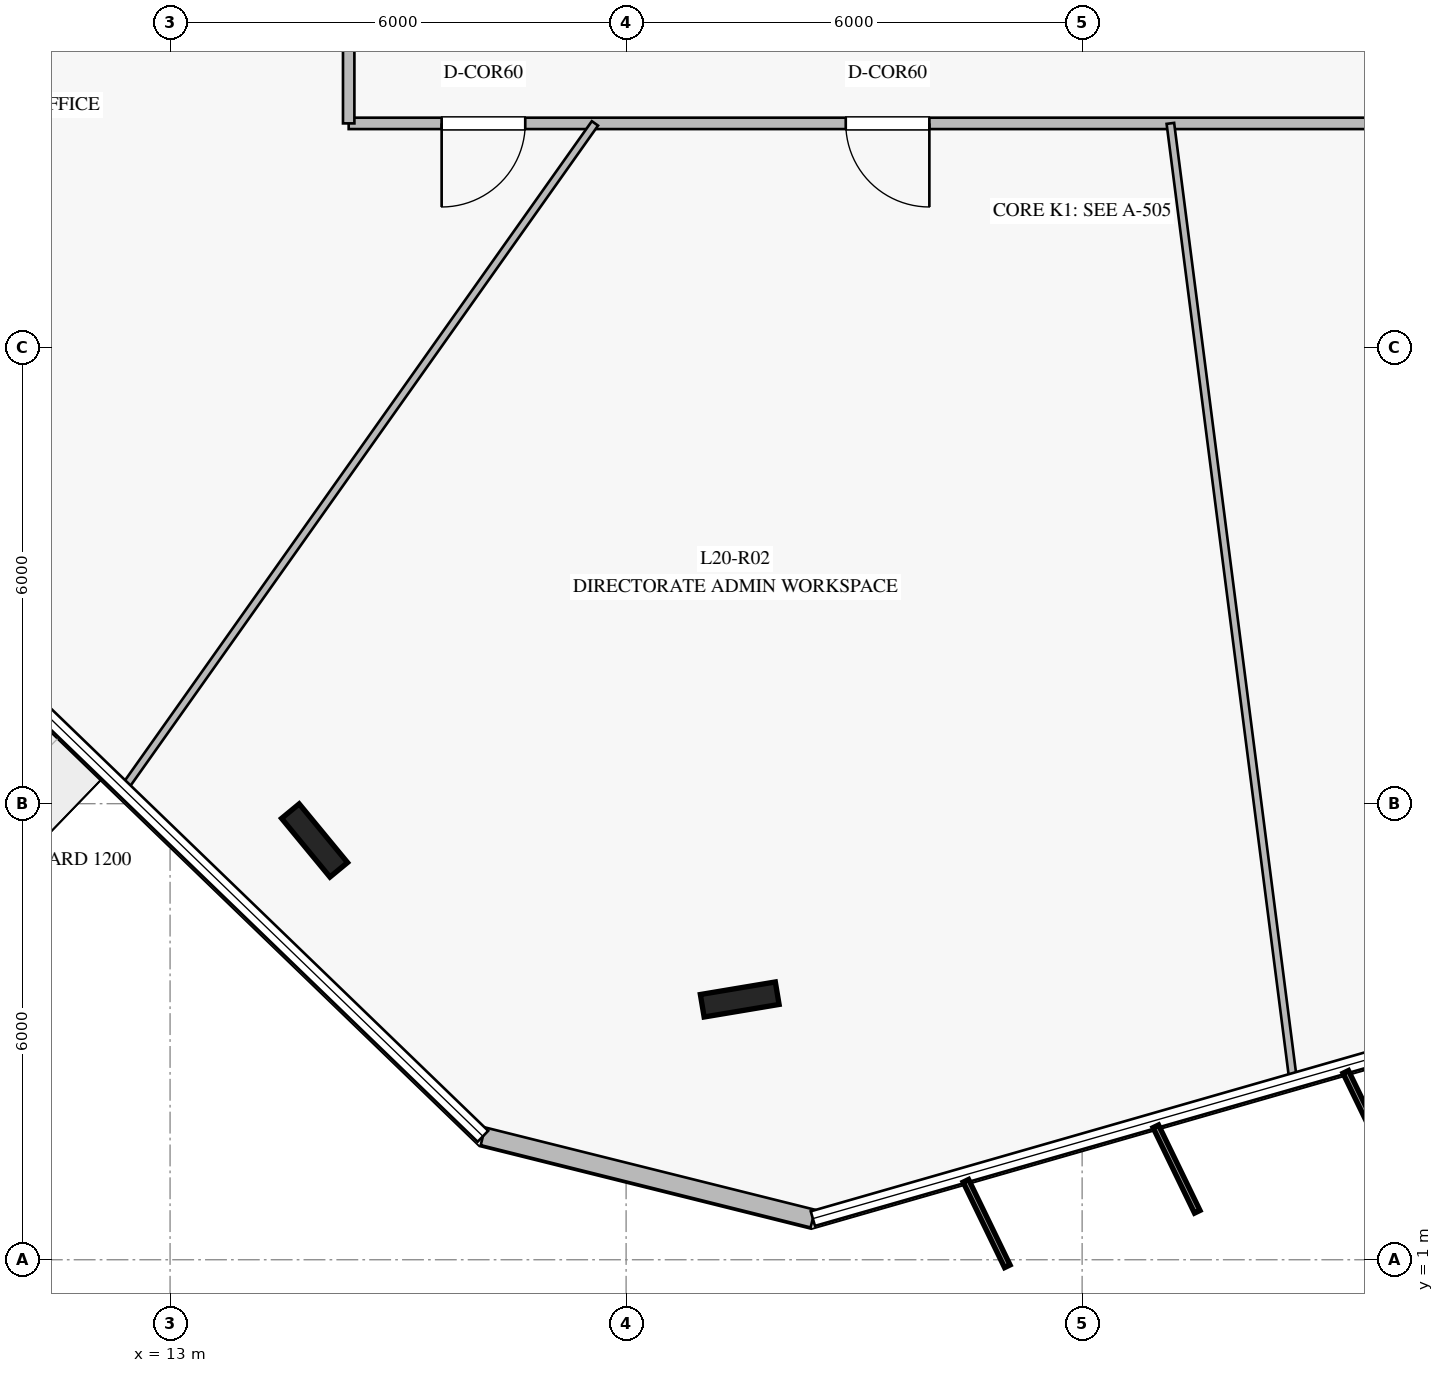
"""IFC4 building model, lengths in metres.
Left out: names, types, materials, properties, quantities, classifications, styles, units other than length and angle.
Written with IfcOpenShell. Run it as: python <this file> out.ifc"""

import sys

from ifc_helpers import new_model, si_unit, direction, frame, frame_2d, origin, origin_2d, place, context, subcontext, project, spatial, rectangle, i_section, extrude, element, fill, save


model = new_model("IFC4")
c1 = context("Model", 3, precision=1e-05, world=origin(), true_north=direction((0.0, 1.0)))
c2 = subcontext(c1, "Body", "Model", "MODEL_VIEW")
j1 = project(units=[si_unit("LENGTHUNIT", "METRE"), si_unit("PLANEANGLEUNIT", "RADIAN")], contexts=[c1])
p1 = place(None, origin())
s1 = spatial("IfcSite", under=j1, at=p1, CompositionType="ELEMENT")
p2 = place(p1, origin())
s2 = spatial("IfcBuilding", under=s1, at=p2, CompositionType="ELEMENT")
p3 = place(p2, frame((0.0, 0.0, 84.0)))
s3 = spatial("IfcBuildingStorey", under=s2, at=p3, CompositionType="ELEMENT", Elevation=84.0)
for number, where, z_axis, x_axis in (
    (1, (14.901, 6.516, 0.0), (0.0, 0.0, 1.0), (-0.636, 0.772, 0.0)),
    (2, (20.495, 4.424, 0.0), (0.0, 0.0, 1.0), (0.986, 0.165, 0.0)),
):
    element("IfcColumn", number, at=place(p3, frame(where, z_axis=z_axis, x_axis=x_axis)), inside=s3, PredefinedType="COLUMN", context=c2, shape_type="SweptSolid", body=[
        extrude(i_section(OverallWidth=0.3, OverallDepth=1.0, WebThickness=0.019, FlangeThickness=0.036, at=origin_2d()), origin(), (0.0, 0.0, 1.0), 4.0),
    ])
p4 = place(p3, frame((17.116, 2.624, 0.0), z_axis=(0.0, 0.0, 1.0), x_axis=(0.970261147955, -0.242060539471, 0.0)))
e3 = element("IfcWall", 3, at=p4, inside=s3, PredefinedType="STANDARD", context=c2, shape_type="SweptSolid", body=[
    extrude(rectangle(XDim=4.474, YDim=0.24, at=frame_2d((2.237, 0.0))), origin(), (0.0, 0.0, 1.0), 3.76),
])
p5 = place(p3, frame((34.65, 15.95, 0.0), z_axis=(0.0, 0.0, 1.0), x_axis=(-1.0, 0.0, 0.0)))
e4 = element("IfcWall", 4, at=p5, inside=s3, PredefinedType="PARTITIONING", context=c2, shape_type="SweptSolid", body=[
    extrude(rectangle(XDim=19.3, YDim=0.15, at=frame_2d((9.65, 0.0))), origin(), (0.0, 0.0, 1.0), 3.21),
])
p6 = place(p5, frame((16.977, 0.0, 0.0)))
e5 = element("IfcOpeningElement", 5, at=p6, cuts=e4, PredefinedType="OPENING", context=c2, shape_type="SweptSolid", body=[
    extrude(rectangle(XDim=1.1, YDim=2.2, at=frame_2d((0.55, 1.1))), frame((0.0, 0.085, 0.0), z_axis=(0.0, -1.0, 0.0), x_axis=(1.0, 0.0, 0.0)), (0.0, 0.0, 1.0), 0.17),
])
p7 = place(p5, frame((11.66, 0.0, 0.0)))
e6 = element("IfcOpeningElement", 6, at=p7, cuts=e4, PredefinedType="OPENING", context=c2, shape_type="SweptSolid", body=[
    extrude(rectangle(XDim=1.1, YDim=2.2, at=frame_2d((0.55, 1.1))), frame((0.0, 0.085, 0.0), z_axis=(0.0, -1.0, 0.0), x_axis=(1.0, 0.0, 0.0)), (0.0, 0.0, 1.0), 0.17),
])
p8 = place(p3, frame((15.35, 15.95, 0.0), z_axis=(0.0, 0.0, 1.0), x_axis=(0.0, 1.0, 0.0)))
e7 = element("IfcWall", 7, at=p8, inside=s3, PredefinedType="PARTITIONING", context=c2, shape_type="SweptSolid", body=[
    extrude(rectangle(XDim=18.1, YDim=0.15, at=frame_2d((9.05, 0.0))), origin(), (0.0, 0.0, 1.0), 3.21),
])
p9 = place(p8, frame((12.936, 0.0, 0.0)))
e8 = element("IfcOpeningElement", 8, at=p9, cuts=e7, PredefinedType="OPENING", context=c2, shape_type="SweptSolid", body=[
    extrude(rectangle(XDim=1.1, YDim=2.2, at=frame_2d((0.55, 1.1))), frame((0.0, 0.085, 0.0), z_axis=(0.0, -1.0, 0.0), x_axis=(1.0, 0.0, 0.0)), (0.0, 0.0, 1.0), 0.17),
])
p10 = place(p3, frame((18.59, 15.95, 0.0), z_axis=(0.0, 0.0, 1.0), x_axis=(-0.577987627676, -0.816045527071, 0.0)))
e9 = element("IfcWall", 9, at=p10, inside=s3, PredefinedType="MOVABLE", context=c2, shape_type="SweptSolid", body=[
    extrude(rectangle(XDim=10.715, YDim=0.1, at=frame_2d((5.357, 0.0))), origin(), (0.0, 0.0, 1.0), 3.06),
])
p11 = place(p3, frame((26.161, 15.95, 0.0), z_axis=(0.0, 0.0, 1.0), x_axis=(0.127277961903, -0.991867088079, 0.0)))
e10 = element("IfcWall", 10, at=p11, inside=s3, PredefinedType="MOVABLE", context=c2, shape_type="SweptSolid", body=[
    extrude(rectangle(XDim=12.681, YDim=0.1, at=frame_2d((6.34, 0.0))), origin(), (0.0, 0.0, 1.0), 3.05),
])
p12 = place(p6, origin())
e11 = element("IfcDoor", 11, at=p12, inside=s3, OperationType="SINGLE_SWING_RIGHT", PredefinedType="DOOR", context=c2, shape_type="SweptSolid", body=[
    extrude(rectangle(XDim=1.1, YDim=2.2, at=frame_2d((0.55, 1.1))), frame((0.0, 0.025, 0.0), z_axis=(0.0, -1.0, 0.0), x_axis=(1.0, 0.0, 0.0)), (0.0, 0.0, 1.0), 0.05),
])
fill(e5, e11)
p13 = place(p7, origin())
e12 = element("IfcDoor", 12, at=p13, inside=s3, OperationType="SINGLE_SWING_LEFT", PredefinedType="DOOR", context=c2, shape_type="SweptSolid", body=[
    extrude(rectangle(XDim=1.1, YDim=2.2, at=frame_2d((0.55, 1.1))), frame((0.0, 0.025, 0.0), z_axis=(0.0, -1.0, 0.0), x_axis=(1.0, 0.0, 0.0)), (0.0, 0.0, 1.0), 0.05),
])
fill(e6, e12)
save(model, sys.argv[1])
